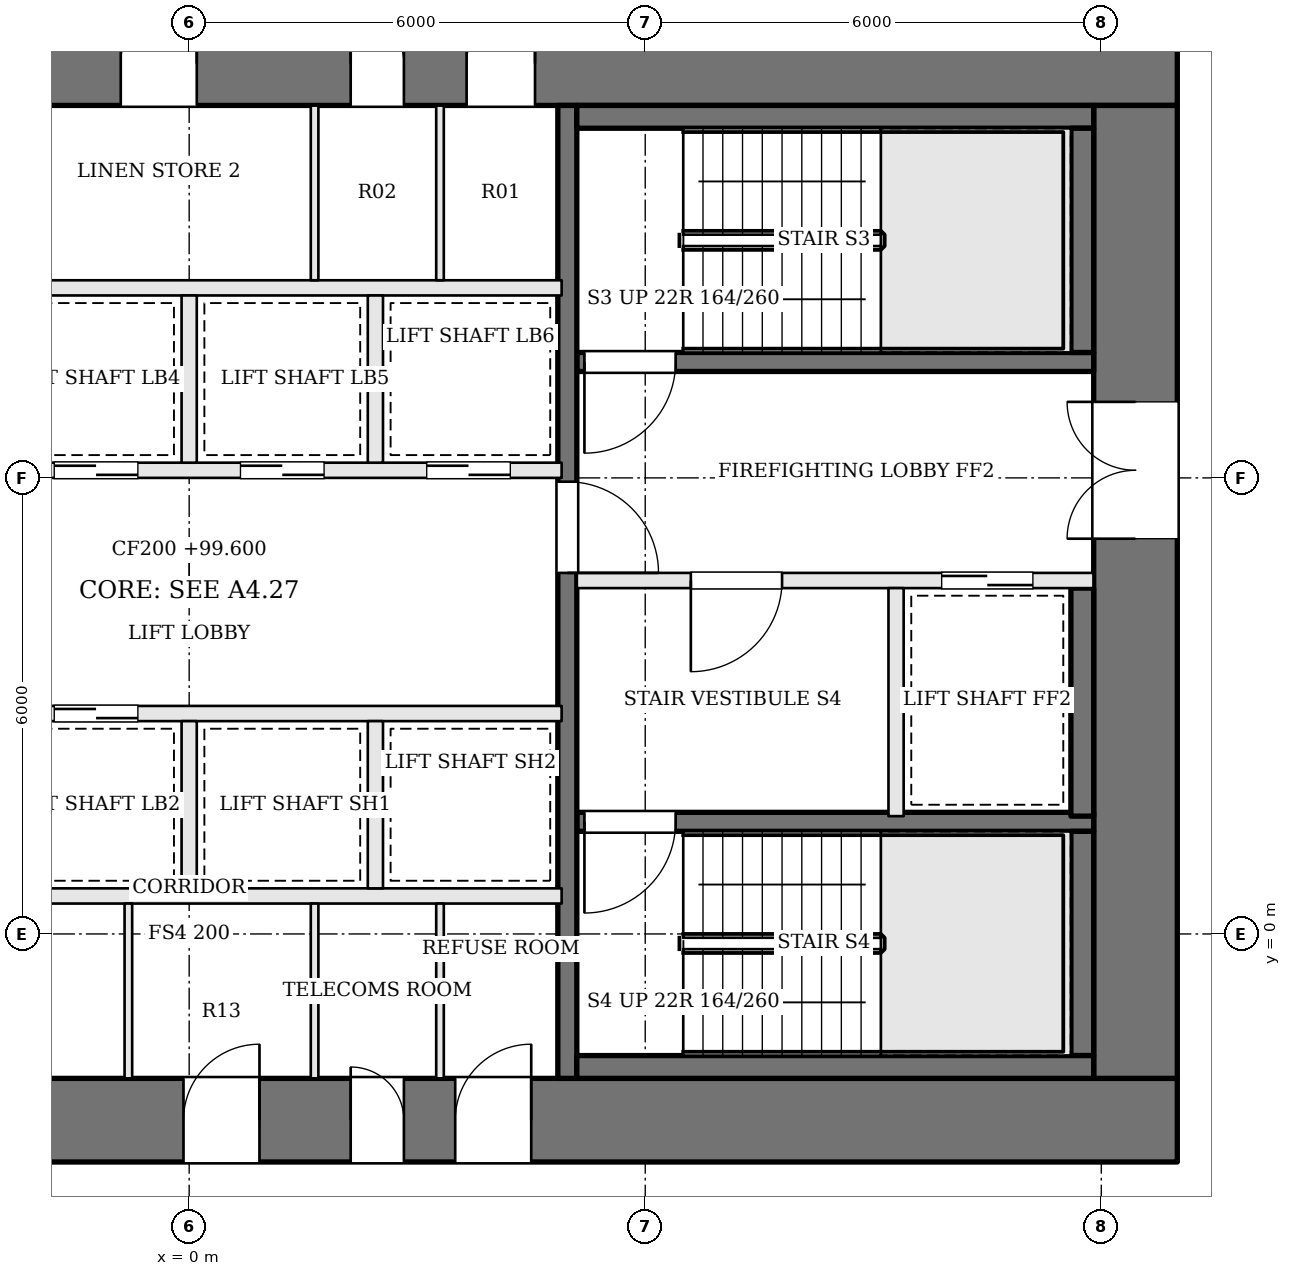
"""IFC4 building model, lengths in metres.
Left out: names, types, materials, properties, quantities, classifications, styles, units other than length and angle.
Written with IfcOpenShell. Run it as: python <this file> out.ifc"""

import sys

from ifc_helpers import new_model, si_unit, direction, frame, frame_2d, origin, place, context, subcontext, project, spatial, rectangle, extrude, element, fill, save


model = new_model("IFC4")
c1 = context("Model", 3, precision=1e-05, world=origin(), true_north=direction((0.0, 1.0)))
c2 = subcontext(c1, "Body", "Model", "MODEL_VIEW")
j1 = project(units=[si_unit("LENGTHUNIT", "METRE"), si_unit("PLANEANGLEUNIT", "RADIAN")], contexts=[c1])
p1 = place(None, origin())
s1 = spatial("IfcSite", under=j1, at=p1, CompositionType="ELEMENT")
p2 = place(p1, origin())
s2 = spatial("IfcBuilding", under=s1, at=p2, CompositionType="ELEMENT")
p3 = place(p2, frame((0.0, 0.0, 99.6)))
s3 = spatial("IfcBuildingStorey", under=s2, at=p3, CompositionType="ELEMENT", Elevation=99.6)
p4 = place(p3, frame((-13.0, 11.45, 0.0), z_axis=(0.0, 0.0, 1.0), x_axis=(1.0, 0.0, 0.0)))
e1 = element("IfcWall", 1, at=p4, inside=s3, PredefinedType="SHEAR", context=c2, shape_type="SweptSolid", body=[
    extrude(rectangle(XDim=26.0, YDim=1.1, at=frame_2d((13.0, 0.0))), origin(), (0.0, 0.0, 1.0), 3.6),
])
p5 = place(p4, frame((8.825, 0.0, 0.0)))
e2 = element("IfcOpeningElement", 2, at=p5, cuts=e1, PredefinedType="OPENING", context=c2, shape_type="SweptSolid", body=[
    extrude(rectangle(XDim=1.0, YDim=2.1, at=frame_2d((0.5, 1.05))), frame((0.0, 0.56, 0.0), z_axis=(0.0, -1.0, 0.0), x_axis=(1.0, 0.0, 0.0)), (0.0, 0.0, 1.0), 1.12),
])
p6 = place(p4, frame((12.1, 0.0, 0.0)))
e3 = element("IfcOpeningElement", 3, at=p6, cuts=e1, PredefinedType="OPENING", context=c2, shape_type="SweptSolid", body=[
    extrude(rectangle(XDim=1.0, YDim=2.1, at=frame_2d((0.5, 1.05))), frame((0.0, 0.56, 0.0), z_axis=(0.0, -1.0, 0.0), x_axis=(1.0, 0.0, 0.0)), (0.0, 0.0, 1.0), 1.12),
])
p7 = place(p4, frame((15.125, 0.0, 0.0)))
e4 = element("IfcOpeningElement", 4, at=p7, cuts=e1, PredefinedType="OPENING", context=c2, shape_type="SweptSolid", body=[
    extrude(rectangle(XDim=0.7, YDim=2.1, at=frame_2d((0.35, 1.05))), frame((0.0, 0.56, 0.0), z_axis=(0.0, -1.0, 0.0), x_axis=(1.0, 0.0, 0.0)), (0.0, 0.0, 1.0), 1.12),
])
p8 = place(p4, frame((16.65, 0.0, 0.0)))
e5 = element("IfcOpeningElement", 5, at=p8, cuts=e1, PredefinedType="OPENING", context=c2, shape_type="SweptSolid", body=[
    extrude(rectangle(XDim=0.9, YDim=2.1, at=frame_2d((0.45, 1.05))), frame((0.0, 0.56, 0.0), z_axis=(0.0, -1.0, 0.0), x_axis=(1.0, 0.0, 0.0)), (0.0, 0.0, 1.0), 1.12),
])
p9 = place(p3, frame((-13.0, -2.45, 0.0), z_axis=(0.0, 0.0, 1.0), x_axis=(1.0, 0.0, 0.0)))
e6 = element("IfcWall", 6, at=p9, inside=s3, PredefinedType="SHEAR", context=c2, shape_type="SweptSolid", body=[
    extrude(rectangle(XDim=26.0, YDim=1.1, at=frame_2d((13.0, 0.0))), origin(), (0.0, 0.0, 1.0), 3.6),
])
p10 = place(p9, frame((9.65, 0.0, 0.0)))
e7 = element("IfcOpeningElement", 7, at=p10, cuts=e6, PredefinedType="OPENING", context=c2, shape_type="SweptSolid", body=[
    extrude(rectangle(XDim=1.0, YDim=2.1, at=frame_2d((0.5, 1.05))), frame((0.0, 0.56, 0.0), z_axis=(0.0, -1.0, 0.0), x_axis=(1.0, 0.0, 0.0)), (0.0, 0.0, 1.0), 1.12),
])
p11 = place(p9, frame((12.925, 0.0, 0.0)))
e8 = element("IfcOpeningElement", 8, at=p11, cuts=e6, PredefinedType="OPENING", context=c2, shape_type="SweptSolid", body=[
    extrude(rectangle(XDim=1.0, YDim=2.1, at=frame_2d((0.5, 1.05))), frame((0.0, 0.56, 0.0), z_axis=(0.0, -1.0, 0.0), x_axis=(1.0, 0.0, 0.0)), (0.0, 0.0, 1.0), 1.12),
])
p12 = place(p9, frame((15.125, 0.0, 0.0)))
e9 = element("IfcOpeningElement", 9, at=p12, cuts=e6, PredefinedType="OPENING", context=c2, shape_type="SweptSolid", body=[
    extrude(rectangle(XDim=0.7, YDim=2.1, at=frame_2d((0.35, 1.05))), frame((0.0, 0.56, 0.0), z_axis=(0.0, -1.0, 0.0), x_axis=(1.0, 0.0, 0.0)), (0.0, 0.0, 1.0), 1.12),
])
p13 = place(p9, frame((16.5, 0.0, 0.0)))
e10 = element("IfcOpeningElement", 10, at=p13, cuts=e6, PredefinedType="OPENING", context=c2, shape_type="SweptSolid", body=[
    extrude(rectangle(XDim=1.0, YDim=2.1, at=frame_2d((0.5, 1.05))), frame((0.0, 0.56, 0.0), z_axis=(0.0, -1.0, 0.0), x_axis=(1.0, 0.0, 0.0)), (0.0, 0.0, 1.0), 1.12),
])
p14 = place(p3, frame((12.45, -1.9, 0.0), z_axis=(0.0, 0.0, 1.0), x_axis=(0.0, 1.0, 0.0)))
e11 = element("IfcWall", 11, at=p14, inside=s3, PredefinedType="SHEAR", context=c2, shape_type="SweptSolid", body=[
    extrude(rectangle(XDim=12.8, YDim=1.1, at=frame_2d((6.4, 0.0))), origin(), (0.0, 0.0, 1.0), 3.6),
])
p15 = place(p14, frame((7.1, 0.0, 0.0)))
e12 = element("IfcOpeningElement", 12, at=p15, cuts=e11, PredefinedType="OPENING", context=c2, shape_type="SweptSolid", body=[
    extrude(rectangle(XDim=1.8, YDim=2.1, at=frame_2d((0.9, 1.05))), frame((0.0, 0.56, 0.0), z_axis=(0.0, -1.0, 0.0), x_axis=(1.0, 0.0, 0.0)), (0.0, 0.0, 1.0), 1.12),
])
p16 = place(p3, frame((11.9, 7.525, 0.0), z_axis=(0.0, 0.0, 1.0), x_axis=(-1.0, 0.0, 0.0)))
e13 = element("IfcWall", 13, at=p16, inside=s3, PredefinedType="SOLIDWALL", context=c2, shape_type="SweptSolid", body=[
    extrude(rectangle(XDim=6.8, YDim=0.25, at=frame_2d((3.4, 0.0))), origin(), (0.0, 0.0, 1.0), 3.4),
])
p17 = place(p16, frame((5.5, 0.0, 0.0)))
e14 = element("IfcOpeningElement", 14, at=p17, cuts=e13, PredefinedType="OPENING", context=c2, shape_type="SweptSolid", body=[
    extrude(rectangle(XDim=1.2, YDim=2.1, at=frame_2d((0.6, 1.05))), frame((0.0, 0.135, 0.0), z_axis=(0.0, -1.0, 0.0), x_axis=(1.0, 0.0, 0.0)), (0.0, 0.0, 1.0), 0.27),
])
p18 = place(p3, frame((11.9, 4.65, 0.0), z_axis=(0.0, 0.0, 1.0), x_axis=(-1.0, 0.0, 0.0)))
e15 = element("IfcWall", 15, at=p18, inside=s3, PredefinedType="SOLIDWALL", context=c2, shape_type="SweptSolid", body=[
    extrude(rectangle(XDim=6.8, YDim=0.2, at=frame_2d((3.4, 0.0))), origin(), (0.0, 0.0, 1.0), 3.4),
])
p19 = place(p18, frame((4.1, 0.0, 0.0)))
e16 = element("IfcOpeningElement", 16, at=p19, cuts=e15, PredefinedType="OPENING", context=c2, shape_type="SweptSolid", body=[
    extrude(rectangle(XDim=1.2, YDim=2.1, at=frame_2d((0.6, 1.05))), frame((0.0, 0.11, 0.0), z_axis=(0.0, -1.0, 0.0), x_axis=(1.0, 0.0, 0.0)), (0.0, 0.0, 1.0), 0.22),
])
p20 = place(p18, frame((0.8, 0.0, 0.0)))
e17 = element("IfcOpeningElement", 17, at=p20, cuts=e15, PredefinedType="OPENING", context=c2, shape_type="SweptSolid", body=[
    extrude(rectangle(XDim=1.2, YDim=2.1, at=frame_2d((0.6, 1.05))), frame((0.0, 0.11, 0.0), z_axis=(0.0, -1.0, 0.0), x_axis=(1.0, 0.0, 0.0)), (0.0, 0.0, 1.0), 0.22),
])
p21 = place(p3, frame((11.9, 1.475, 0.0), z_axis=(0.0, 0.0, 1.0), x_axis=(-1.0, 0.0, 0.0)))
e18 = element("IfcWall", 18, at=p21, inside=s3, PredefinedType="SOLIDWALL", context=c2, shape_type="SweptSolid", body=[
    extrude(rectangle(XDim=6.8, YDim=0.25, at=frame_2d((3.4, 0.0))), origin(), (0.0, 0.0, 1.0), 3.4),
])
p22 = place(p21, frame((5.5, 0.0, 0.0)))
e19 = element("IfcOpeningElement", 19, at=p22, cuts=e18, PredefinedType="OPENING", context=c2, shape_type="SweptSolid", body=[
    extrude(rectangle(XDim=1.2, YDim=2.1, at=frame_2d((0.6, 1.05))), frame((0.0, 0.135, 0.0), z_axis=(0.0, -1.0, 0.0), x_axis=(1.0, 0.0, 0.0)), (0.0, 0.0, 1.0), 0.27),
])
p23 = place(p3, frame((9.3, 4.55, 0.0), z_axis=(0.0, 0.0, 1.0), x_axis=(0.0, -1.0, 0.0)))
e20 = element("IfcWall", 20, at=p23, inside=s3, PredefinedType="SOLIDWALL", context=c2, shape_type="SweptSolid", body=[
    extrude(rectangle(XDim=3.0, YDim=0.2, at=frame_2d((1.5, 0.0))), origin(), (0.0, 0.0, 1.0), 3.4),
])
p24 = place(p3, frame((4.975, 10.9, 0.0), z_axis=(0.0, 0.0, 1.0), x_axis=(0.0, -1.0, 0.0)))
e21 = element("IfcWall", 21, at=p24, inside=s3, PredefinedType="SOLIDWALL", context=c2, shape_type="SweptSolid", body=[
    extrude(rectangle(XDim=12.8, YDim=0.25, at=frame_2d((6.4, 0.0))), origin(), (0.0, 0.0, 1.0), 3.4),
])
p25 = place(p24, frame((4.95, 0.0, 0.0)))
e22 = element("IfcOpeningElement", 22, at=p25, cuts=e21, PredefinedType="OPENING", context=c2, shape_type="SweptSolid", body=[
    extrude(rectangle(XDim=1.2, YDim=2.1, at=frame_2d((0.6, 1.05))), frame((0.0, 0.135, 0.0), z_axis=(0.0, -1.0, 0.0), x_axis=(1.0, 0.0, 0.0)), (0.0, 0.0, 1.0), 0.27),
])
p26 = place(p3, frame((11.9, 10.75, 0.0), z_axis=(0.0, 0.0, 1.0), x_axis=(-1.0, 0.0, 0.0)))
e23 = element("IfcWall", 23, at=p26, inside=s3, PredefinedType="SOLIDWALL", context=c2, shape_type="SweptSolid", body=[
    extrude(rectangle(XDim=6.8, YDim=0.3, at=frame_2d((3.4, 0.0))), origin(), (0.0, 0.0, 1.0), 3.4),
])
p27 = place(p3, frame((11.75, 10.6, 0.0), z_axis=(0.0, 0.0, 1.0), x_axis=(0.0, -1.0, 0.0)))
e24 = element("IfcWall", 24, at=p27, inside=s3, PredefinedType="SOLIDWALL", context=c2, shape_type="SweptSolid", body=[
    extrude(rectangle(XDim=2.95, YDim=0.3, at=frame_2d((1.475, 0.0))), origin(), (0.0, 0.0, 1.0), 3.4),
])
p28 = place(p3, frame((11.75, 4.55, 0.0), z_axis=(0.0, 0.0, 1.0), x_axis=(0.0, -1.0, 0.0)))
e25 = element("IfcWall", 25, at=p28, inside=s3, PredefinedType="SOLIDWALL", context=c2, shape_type="SweptSolid", body=[
    extrude(rectangle(XDim=3.0, YDim=0.3, at=frame_2d((1.5, 0.0))), origin(), (0.0, 0.0, 1.0), 3.4),
])
p29 = place(p3, frame((11.75, 1.35, 0.0), z_axis=(0.0, 0.0, 1.0), x_axis=(0.0, -1.0, 0.0)))
e26 = element("IfcWall", 26, at=p29, inside=s3, PredefinedType="SOLIDWALL", context=c2, shape_type="SweptSolid", body=[
    extrude(rectangle(XDim=2.95, YDim=0.3, at=frame_2d((1.475, 0.0))), origin(), (0.0, 0.0, 1.0), 3.4),
])
p30 = place(p3, frame((11.9, -1.75, 0.0), z_axis=(0.0, 0.0, 1.0), x_axis=(-1.0, 0.0, 0.0)))
e27 = element("IfcWall", 27, at=p30, inside=s3, PredefinedType="SOLIDWALL", context=c2, shape_type="SweptSolid", body=[
    extrude(rectangle(XDim=6.8, YDim=0.3, at=frame_2d((3.4, 0.0))), origin(), (0.0, 0.0, 1.0), 3.4),
])
p31 = place(p3, frame((-4.9, 0.5, 0.0), z_axis=(0.0, 0.0, 1.0), x_axis=(1.0, 0.0, 0.0)))
e28 = element("IfcWall", 28, at=p31, inside=s3, PredefinedType="SOLIDWALL", context=c2, shape_type="SweptSolid", body=[
    extrude(rectangle(XDim=9.8, YDim=0.2, at=frame_2d((4.9, 0.0))), origin(), (0.0, 0.0, 1.0), 3.4),
])
p32 = place(p3, frame((-4.9, 2.9, 0.0), z_axis=(0.0, 0.0, 1.0), x_axis=(1.0, 0.0, 0.0)))
e29 = element("IfcWall", 29, at=p32, inside=s3, PredefinedType="SOLIDWALL", context=c2, shape_type="SweptSolid", body=[
    extrude(rectangle(XDim=9.8, YDim=0.2, at=frame_2d((4.9, 0.0))), origin(), (0.0, 0.0, 1.0), 3.4),
])
p33 = place(p32, frame((0.675, 0.0, 0.0)))
e30 = element("IfcOpeningElement", 30, at=p33, cuts=e29, PredefinedType="OPENING", context=c2, shape_type="SweptSolid", body=[
    extrude(rectangle(XDim=1.1, YDim=2.1, at=frame_2d((0.55, 1.05))), frame((0.0, 0.11, 0.0), z_axis=(0.0, -1.0, 0.0), x_axis=(1.0, 0.0, 0.0)), (0.0, 0.0, 1.0), 0.22),
])
p34 = place(p32, frame((3.125, 0.0, 0.0)))
e31 = element("IfcOpeningElement", 31, at=p34, cuts=e29, PredefinedType="OPENING", context=c2, shape_type="SweptSolid", body=[
    extrude(rectangle(XDim=1.1, YDim=2.1, at=frame_2d((0.55, 1.05))), frame((0.0, 0.11, 0.0), z_axis=(0.0, -1.0, 0.0), x_axis=(1.0, 0.0, 0.0)), (0.0, 0.0, 1.0), 0.22),
])
p35 = place(p3, frame((-4.9, 6.1, 0.0), z_axis=(0.0, 0.0, 1.0), x_axis=(1.0, 0.0, 0.0)))
e32 = element("IfcWall", 32, at=p35, inside=s3, PredefinedType="SOLIDWALL", context=c2, shape_type="SweptSolid", body=[
    extrude(rectangle(XDim=9.8, YDim=0.2, at=frame_2d((4.9, 0.0))), origin(), (0.0, 0.0, 1.0), 3.4),
])
p36 = place(p35, frame((0.675, 0.0, 0.0)))
e33 = element("IfcOpeningElement", 33, at=p36, cuts=e32, PredefinedType="OPENING", context=c2, shape_type="SweptSolid", body=[
    extrude(rectangle(XDim=1.1, YDim=2.1, at=frame_2d((0.55, 1.05))), frame((0.0, 0.11, 0.0), z_axis=(0.0, -1.0, 0.0), x_axis=(1.0, 0.0, 0.0)), (0.0, 0.0, 1.0), 0.22),
])
p37 = place(p35, frame((3.125, 0.0, 0.0)))
e34 = element("IfcOpeningElement", 34, at=p37, cuts=e32, PredefinedType="OPENING", context=c2, shape_type="SweptSolid", body=[
    extrude(rectangle(XDim=1.1, YDim=2.1, at=frame_2d((0.55, 1.05))), frame((0.0, 0.11, 0.0), z_axis=(0.0, -1.0, 0.0), x_axis=(1.0, 0.0, 0.0)), (0.0, 0.0, 1.0), 0.22),
])
p38 = place(p35, frame((5.575, 0.0, 0.0)))
e35 = element("IfcOpeningElement", 35, at=p38, cuts=e32, PredefinedType="OPENING", context=c2, shape_type="SweptSolid", body=[
    extrude(rectangle(XDim=1.1, YDim=2.1, at=frame_2d((0.55, 1.05))), frame((0.0, 0.11, 0.0), z_axis=(0.0, -1.0, 0.0), x_axis=(1.0, 0.0, 0.0)), (0.0, 0.0, 1.0), 0.22),
])
p39 = place(p35, frame((8.025, 0.0, 0.0)))
e36 = element("IfcOpeningElement", 36, at=p39, cuts=e32, PredefinedType="OPENING", context=c2, shape_type="SweptSolid", body=[
    extrude(rectangle(XDim=1.1, YDim=2.1, at=frame_2d((0.55, 1.05))), frame((0.0, 0.11, 0.0), z_axis=(0.0, -1.0, 0.0), x_axis=(1.0, 0.0, 0.0)), (0.0, 0.0, 1.0), 0.22),
])
p40 = place(p3, frame((-4.9, 8.5, 0.0), z_axis=(0.0, 0.0, 1.0), x_axis=(1.0, 0.0, 0.0)))
e37 = element("IfcWall", 37, at=p40, inside=s3, PredefinedType="SOLIDWALL", context=c2, shape_type="SweptSolid", body=[
    extrude(rectangle(XDim=9.8, YDim=0.2, at=frame_2d((4.9, 0.0))), origin(), (0.0, 0.0, 1.0), 3.4),
])
for number, where, z_axis, x_axis in (
    (38, (0.0, 0.6, 0.0), (0.0, 0.0, 1.0), (0.0, 1.0, 0.0)),
    (39, (2.45, 0.6, 0.0), (0.0, 0.0, 1.0), (0.0, 1.0, 0.0)),
    (40, (0.0, 6.2, 0.0), (0.0, 0.0, 1.0), (0.0, 1.0, 0.0)),
    (41, (2.45, 6.2, 0.0), (0.0, 0.0, 1.0), (0.0, 1.0, 0.0)),
):
    element("IfcWall", number, at=place(p3, frame(where, z_axis=z_axis, x_axis=x_axis)), inside=s3, PredefinedType="SOLIDWALL", context=c2, shape_type="SweptSolid", body=[
        extrude(rectangle(XDim=2.2, YDim=0.2, at=frame_2d((1.1, 0.0))), origin(), (0.0, 0.0, 1.0), 3.4),
    ])
for number, where, z_axis, x_axis in (
    (42, (-0.8, -1.9, 0.0), (0.0, 0.0, 1.0), (0.0, 1.0, 0.0)),
    (43, (1.65, -1.9, 0.0), (0.0, 0.0, 1.0), (0.0, 1.0, 0.0)),
    (44, (3.3, -1.9, 0.0), (0.0, 0.0, 1.0), (0.0, 1.0, 0.0)),
    (45, (1.65, 8.6, 0.0), (0.0, 0.0, 1.0), (0.0, 1.0, 0.0)),
    (46, (3.3, 8.6, 0.0), (0.0, 0.0, 1.0), (0.0, 1.0, 0.0)),
):
    element("IfcWall", number, at=place(p3, frame(where, z_axis=z_axis, x_axis=x_axis)), inside=s3, PredefinedType="PARTITIONING", context=c2, shape_type="SweptSolid", body=[
        extrude(rectangle(XDim=2.3, YDim=0.1, at=frame_2d((1.15, 0.0))), origin(), (0.0, 0.0, 1.0), 3.4),
    ])
p41 = place(p15, origin())
e47 = element("IfcDoor", 47, at=p41, inside=s3, OperationType="DOUBLE_DOOR_SINGLE_SWING", PredefinedType="DOOR", context=c2, shape_type="SweptSolid", body=[
    extrude(rectangle(XDim=1.8, YDim=2.1, at=frame_2d((0.9, 1.05))), frame((0.0, 0.025, 0.0), z_axis=(0.0, -1.0, 0.0), x_axis=(1.0, 0.0, 0.0)), (0.0, 0.0, 1.0), 0.05),
])
fill(e12, e47)
p42 = place(p25, origin())
e48 = element("IfcDoor", 48, at=p42, inside=s3, OperationType="SINGLE_SWING_RIGHT", PredefinedType="DOOR", context=c2, shape_type="SweptSolid", body=[
    extrude(rectangle(XDim=1.2, YDim=2.1, at=frame_2d((0.6, 1.05))), frame((0.0, 0.025, 0.0), z_axis=(0.0, -1.0, 0.0), x_axis=(1.0, 0.0, 0.0)), (0.0, 0.0, 1.0), 0.05),
])
fill(e22, e48)
p43 = place(p19, origin())
e49 = element("IfcDoor", 49, at=p43, inside=s3, OperationType="SINGLE_SWING_RIGHT", PredefinedType="DOOR", context=c2, shape_type="SweptSolid", body=[
    extrude(rectangle(XDim=1.2, YDim=2.1, at=frame_2d((0.6, 1.05))), frame((0.0, 0.025, 0.0), z_axis=(0.0, -1.0, 0.0), x_axis=(1.0, 0.0, 0.0)), (0.0, 0.0, 1.0), 0.05),
])
fill(e16, e49)
p44 = place(p17, origin())
e50 = element("IfcDoor", 50, at=p44, inside=s3, OperationType="SINGLE_SWING_RIGHT", PredefinedType="DOOR", context=c2, shape_type="SweptSolid", body=[
    extrude(rectangle(XDim=1.2, YDim=2.1, at=frame_2d((0.6, 1.05))), frame((0.0, 0.025, 0.0), z_axis=(0.0, -1.0, 0.0), x_axis=(1.0, 0.0, 0.0)), (0.0, 0.0, 1.0), 0.05),
])
fill(e14, e50)
p45 = place(p22, origin())
e51 = element("IfcDoor", 51, at=p45, inside=s3, OperationType="SINGLE_SWING_RIGHT", PredefinedType="DOOR", context=c2, shape_type="SweptSolid", body=[
    extrude(rectangle(XDim=1.2, YDim=2.1, at=frame_2d((0.6, 1.05))), frame((0.0, 0.025, 0.0), z_axis=(0.0, -1.0, 0.0), x_axis=(1.0, 0.0, 0.0)), (0.0, 0.0, 1.0), 0.05),
])
fill(e19, e51)
p46 = place(p20, origin())
e52 = element("IfcDoor", 52, at=p46, inside=s3, OperationType="SLIDING_TO_RIGHT", PredefinedType="DOOR", context=c2, shape_type="SweptSolid", body=[
    extrude(rectangle(XDim=1.2, YDim=2.1, at=frame_2d((0.6, 1.05))), frame((0.0, 0.025, 0.0), z_axis=(0.0, -1.0, 0.0), x_axis=(1.0, 0.0, 0.0)), (0.0, 0.0, 1.0), 0.05),
])
fill(e17, e52)
p47 = place(p34, origin())
e53 = element("IfcDoor", 53, at=p47, inside=s3, OperationType="SLIDING_TO_LEFT", PredefinedType="DOOR", context=c2, shape_type="SweptSolid", body=[
    extrude(rectangle(XDim=1.1, YDim=2.1, at=frame_2d((0.55, 1.05))), frame((0.0, 0.025, 0.0), z_axis=(0.0, -1.0, 0.0), x_axis=(1.0, 0.0, 0.0)), (0.0, 0.0, 1.0), 0.05),
])
fill(e31, e53)
p48 = place(p37, origin())
e54 = element("IfcDoor", 54, at=p48, inside=s3, OperationType="SLIDING_TO_LEFT", PredefinedType="DOOR", context=c2, shape_type="SweptSolid", body=[
    extrude(rectangle(XDim=1.1, YDim=2.1, at=frame_2d((0.55, 1.05))), frame((0.0, 0.025, 0.0), z_axis=(0.0, -1.0, 0.0), x_axis=(1.0, 0.0, 0.0)), (0.0, 0.0, 1.0), 0.05),
])
fill(e34, e54)
p49 = place(p38, origin())
e55 = element("IfcDoor", 55, at=p49, inside=s3, OperationType="SLIDING_TO_RIGHT", PredefinedType="DOOR", context=c2, shape_type="SweptSolid", body=[
    extrude(rectangle(XDim=1.1, YDim=2.1, at=frame_2d((0.55, 1.05))), frame((0.0, 0.025, 0.0), z_axis=(0.0, -1.0, 0.0), x_axis=(1.0, 0.0, 0.0)), (0.0, 0.0, 1.0), 0.05),
])
fill(e35, e55)
p50 = place(p39, origin())
e56 = element("IfcDoor", 56, at=p50, inside=s3, OperationType="SLIDING_TO_LEFT", PredefinedType="DOOR", context=c2, shape_type="SweptSolid", body=[
    extrude(rectangle(XDim=1.1, YDim=2.1, at=frame_2d((0.55, 1.05))), frame((0.0, 0.025, 0.0), z_axis=(0.0, -1.0, 0.0), x_axis=(1.0, 0.0, 0.0)), (0.0, 0.0, 1.0), 0.05),
])
fill(e36, e56)
p51 = place(p11, origin())
e57 = element("IfcDoor", 57, at=p51, inside=s3, OperationType="SINGLE_SWING_RIGHT", PredefinedType="DOOR", context=c2, shape_type="SweptSolid", body=[
    extrude(rectangle(XDim=1.0, YDim=2.1, at=frame_2d((0.5, 1.05))), frame((0.0, 0.025, 0.0), z_axis=(0.0, -1.0, 0.0), x_axis=(1.0, 0.0, 0.0)), (0.0, 0.0, 1.0), 0.05),
])
fill(e8, e57)
p52 = place(p12, origin())
e58 = element("IfcDoor", 58, at=p52, inside=s3, OperationType="SINGLE_SWING_LEFT", PredefinedType="DOOR", context=c2, shape_type="SweptSolid", body=[
    extrude(rectangle(XDim=0.7, YDim=2.1, at=frame_2d((0.35, 1.05))), frame((0.0, 0.025, 0.0), z_axis=(0.0, -1.0, 0.0), x_axis=(1.0, 0.0, 0.0)), (0.0, 0.0, 1.0), 0.05),
])
fill(e9, e58)
p53 = place(p13, origin())
e59 = element("IfcDoor", 59, at=p53, inside=s3, OperationType="SINGLE_SWING_RIGHT", PredefinedType="DOOR", context=c2, shape_type="SweptSolid", body=[
    extrude(rectangle(XDim=1.0, YDim=2.1, at=frame_2d((0.5, 1.05))), frame((0.0, 0.025, 0.0), z_axis=(0.0, -1.0, 0.0), x_axis=(1.0, 0.0, 0.0)), (0.0, 0.0, 1.0), 0.05),
])
fill(e10, e59)
p54 = place(p6, origin())
e60 = element("IfcDoor", 60, at=p54, inside=s3, OperationType="SINGLE_SWING_RIGHT", PredefinedType="DOOR", context=c2, shape_type="SweptSolid", body=[
    extrude(rectangle(XDim=1.0, YDim=2.1, at=frame_2d((0.5, 1.05))), frame((0.0, 0.025, 0.0), z_axis=(0.0, -1.0, 0.0), x_axis=(1.0, 0.0, 0.0)), (0.0, 0.0, 1.0), 0.05),
])
fill(e3, e60)
p55 = place(p7, origin())
e61 = element("IfcDoor", 61, at=p55, inside=s3, OperationType="SINGLE_SWING_LEFT", PredefinedType="DOOR", context=c2, shape_type="SweptSolid", body=[
    extrude(rectangle(XDim=0.7, YDim=2.1, at=frame_2d((0.35, 1.05))), frame((0.0, 0.025, 0.0), z_axis=(0.0, -1.0, 0.0), x_axis=(1.0, 0.0, 0.0)), (0.0, 0.0, 1.0), 0.05),
])
fill(e4, e61)
p56 = place(p8, origin())
e62 = element("IfcDoor", 62, at=p56, inside=s3, OperationType="SINGLE_SWING_RIGHT", PredefinedType="DOOR", context=c2, shape_type="SweptSolid", body=[
    extrude(rectangle(XDim=0.9, YDim=2.1, at=frame_2d((0.45, 1.05))), frame((0.0, 0.025, 0.0), z_axis=(0.0, -1.0, 0.0), x_axis=(1.0, 0.0, 0.0)), (0.0, 0.0, 1.0), 0.05),
])
fill(e5, e62)
save(model, sys.argv[1])
